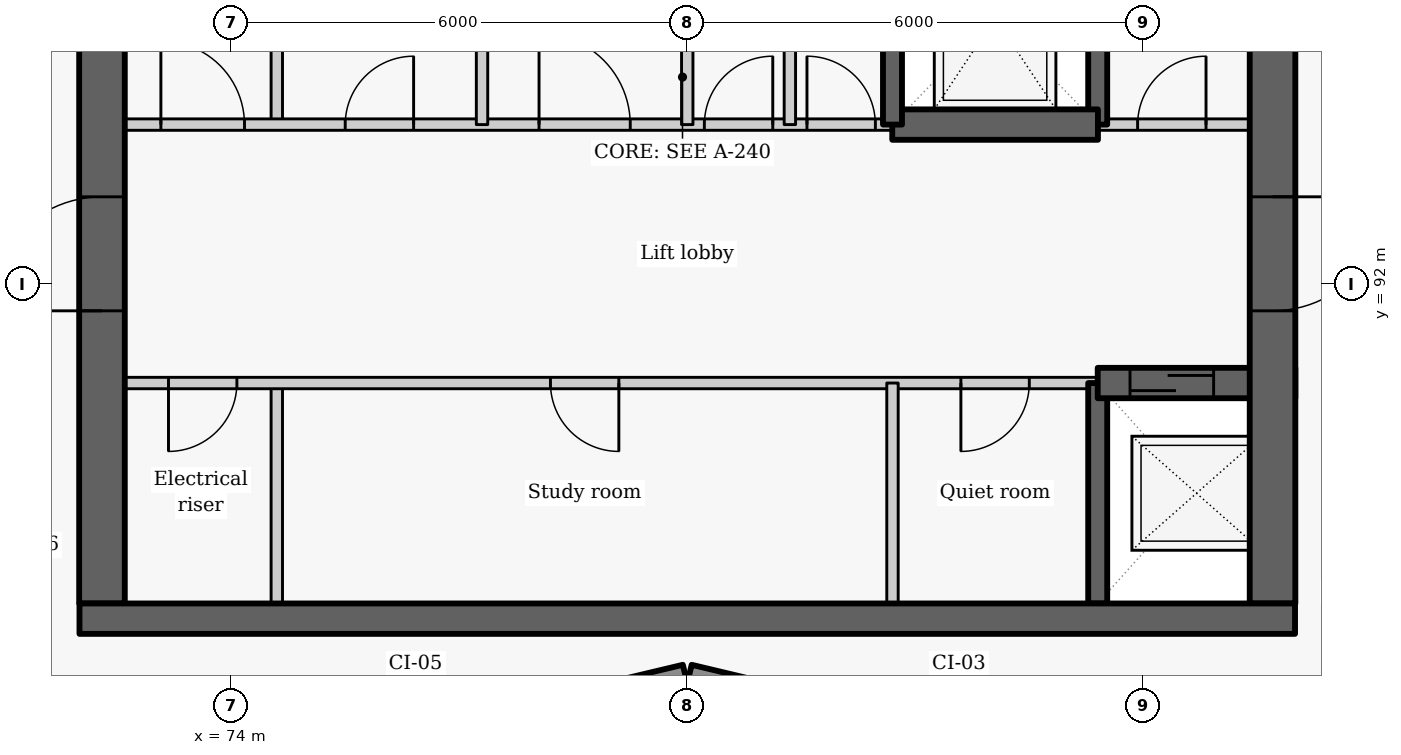
"""IFC4 building model, lengths in metres.
Left out: names, types, materials, properties, quantities, classifications, styles, units other than length and angle.
Written with IfcOpenShell. Run it as: python <this file> out.ifc"""

import sys

from ifc_helpers import new_model, si_unit, direction, frame, frame_2d, origin, place, context, subcontext, project, spatial, rectangle, extrude, element, fill, save


model = new_model("IFC4")
c1 = context("Model", 3, precision=1e-05, world=origin(), true_north=direction((0.0, 1.0)))
c2 = subcontext(c1, "Body", "Model", "MODEL_VIEW")
j1 = project(units=[si_unit("LENGTHUNIT", "METRE"), si_unit("PLANEANGLEUNIT", "RADIAN")], contexts=[c1])
p1 = place(None, origin())
s1 = spatial("IfcSite", under=j1, at=p1, CompositionType="ELEMENT")
p2 = place(p1, origin())
s2 = spatial("IfcBuilding", under=s1, at=p2, CompositionType="ELEMENT")
p3 = place(p2, frame((0.0, 0.0, 229.5)))
s3 = spatial("IfcBuildingStorey", under=s2, at=p3, CompositionType="ELEMENT", Elevation=229.5)
for number, where, z_axis, x_axis in (
    (1, (76.814, 86.119, 0.0), (0.0, 0.0, 1.0), (0.973, 0.232, 0.0)),
    (2, (80.029, 86.872, 0.0), (0.0, 0.0, 1.0), (0.973, -0.232, 0.0)),
):
    element("IfcWall", number, at=place(p3, frame(where, z_axis=z_axis, x_axis=x_axis)), inside=s3, PredefinedType="SOLIDWALL", context=c2, shape_type="SweptSolid", body=[
        extrude(rectangle(XDim=3.246, YDim=0.25, at=frame_2d((1.623, 0.0))), origin(), (0.0, 0.0, 1.0), 2.425),
    ])
p4 = place(p3, frame((74.6, 87.8, 0.0), z_axis=(0.0, 0.0, 1.0), x_axis=(0.0, 1.0, 0.0)))
e3 = element("IfcWall", 3, at=p4, inside=s3, PredefinedType="PARTITIONING", context=c2, shape_type="SweptSolid", body=[
    extrude(rectangle(XDim=2.9, YDim=0.15, at=frame_2d((1.45, 0.0))), origin(), (0.0, 0.0, 1.0), 3.025),
])
p5 = place(p3, frame((74.6, 94.1, 0.0), z_axis=(0.0, 0.0, 1.0), x_axis=(0.0, 1.0, 0.0)))
e4 = element("IfcWall", 4, at=p5, inside=s3, PredefinedType="PARTITIONING", context=c2, shape_type="SweptSolid", body=[
    extrude(rectangle(XDim=2.8, YDim=0.15, at=frame_2d((1.4, 0.0))), origin(), (0.0, 0.0, 1.0), 3.025),
])
p6 = place(p3, frame((85.4, 90.7, 0.0), z_axis=(0.0, 0.0, 1.0), x_axis=(-1.0, 0.0, 0.0)))
e5 = element("IfcWall", 5, at=p6, inside=s3, PredefinedType="PARTITIONING", context=c2, shape_type="SweptSolid", body=[
    extrude(rectangle(XDim=13.4, YDim=0.15, at=frame_2d((6.7, 0.0))), origin(), (0.0, 0.0, 1.0), 3.025),
])
p7 = place(p6, frame((11.325, 0.0, 0.0)))
e6 = element("IfcOpeningElement", 6, at=p7, cuts=e5, PredefinedType="OPENING", context=c2, shape_type="SweptSolid", body=[
    extrude(rectangle(XDim=0.9, YDim=2.1, at=frame_2d((0.45, 1.05))), frame((0.0, 0.085, 0.0), z_axis=(0.0, -1.0, 0.0), x_axis=(1.0, 0.0, 0.0)), (0.0, 0.0, 1.0), 0.17),
])
p8 = place(p6, frame((6.3, 0.0, 0.0)))
e7 = element("IfcOpeningElement", 7, at=p8, cuts=e5, PredefinedType="OPENING", context=c2, shape_type="SweptSolid", body=[
    extrude(rectangle(XDim=0.9, YDim=2.1, at=frame_2d((0.45, 1.05))), frame((0.0, 0.085, 0.0), z_axis=(0.0, -1.0, 0.0), x_axis=(1.0, 0.0, 0.0)), (0.0, 0.0, 1.0), 0.17),
])
p9 = place(p6, frame((0.9, 0.0, 0.0)))
e8 = element("IfcOpeningElement", 8, at=p9, cuts=e5, PredefinedType="OPENING", context=c2, shape_type="SweptSolid", body=[
    extrude(rectangle(XDim=0.9, YDim=2.1, at=frame_2d((0.45, 1.05))), frame((0.0, 0.085, 0.0), z_axis=(0.0, -1.0, 0.0), x_axis=(1.0, 0.0, 0.0)), (0.0, 0.0, 1.0), 0.17),
])
p10 = place(p3, frame((72.3, 87.8, -0.275), z_axis=(0.0, 0.0, 1.0), x_axis=(0.0, 1.0, 0.0)))
e9 = element("IfcWall", 9, at=p10, inside=s3, PredefinedType="SHEAR", context=c2, shape_type="SweptSolid", body=[
    extrude(rectangle(XDim=9.1, YDim=0.6, at=frame_2d((4.55, 0.0))), origin(), (0.0, 0.0, 1.0), 3.3),
])
p11 = place(p10, frame((3.85, 0.0, 0.275)))
e10 = element("IfcOpeningElement", 10, at=p11, cuts=e9, PredefinedType="OPENING", context=c2, shape_type="SweptSolid", body=[
    extrude(rectangle(XDim=1.5, YDim=2.1, at=frame_2d((0.75, 1.05))), frame((0.0, 0.31, 0.0), z_axis=(0.0, -1.0, 0.0), x_axis=(1.0, 0.0, 0.0)), (0.0, 0.0, 1.0), 0.62),
])
p12 = place(p3, frame((85.4, 87.8, -0.275), z_axis=(0.0, 0.0, 1.0), x_axis=(0.0, 1.0, 0.0)))
e11 = element("IfcWall", 11, at=p12, inside=s3, PredefinedType="SHEAR", context=c2, shape_type="SweptSolid", body=[
    extrude(rectangle(XDim=2.9, YDim=0.25, at=frame_2d((1.45, 0.0))), origin(), (0.0, 0.0, 1.0), 3.3),
])
p13 = place(p3, frame((85.4, 94.1, -0.275), z_axis=(0.0, 0.0, 1.0), x_axis=(0.0, 1.0, 0.0)))
e12 = element("IfcWall", 12, at=p13, inside=s3, PredefinedType="SHEAR", context=c2, shape_type="SweptSolid", body=[
    extrude(rectangle(XDim=2.8, YDim=0.25, at=frame_2d((1.4, 0.0))), origin(), (0.0, 0.0, 1.0), 3.3),
])
p14 = place(p3, frame((85.4, 90.7, -0.275), z_axis=(0.0, 0.0, 1.0), x_axis=(1.0, 0.0, 0.0)))
e13 = element("IfcWall", 13, at=p14, inside=s3, PredefinedType="SHEAR", context=c2, shape_type="SweptSolid", body=[
    extrude(rectangle(XDim=2.6, YDim=0.4, at=frame_2d((1.3, 0.0))), origin(), (0.0, 0.0, 1.0), 3.3),
])
p15 = place(p14, frame((0.425, 0.0, 0.275)))
e14 = element("IfcOpeningElement", 14, at=p15, cuts=e13, PredefinedType="OPENING", context=c2, shape_type="SweptSolid", body=[
    extrude(rectangle(XDim=1.1, YDim=2.1, at=frame_2d((0.55, 1.05))), frame((0.0, 0.21, 0.0), z_axis=(0.0, -1.0, 0.0), x_axis=(1.0, 0.0, 0.0)), (0.0, 0.0, 1.0), 0.42),
])
p16 = place(p3, frame((87.7, 102.05, -0.275), z_axis=(0.0, 0.0, 1.0), x_axis=(0.0, -1.0, 0.0)))
e15 = element("IfcWall", 15, at=p16, inside=s3, PredefinedType="SHEAR", context=c2, shape_type="SweptSolid", body=[
    extrude(rectangle(XDim=14.25, YDim=0.6, at=frame_2d((7.125, 0.0))), origin(), (0.0, 0.0, 1.0), 3.3),
])
p17 = place(p16, frame((8.9, 0.0, 0.275)))
e16 = element("IfcOpeningElement", 16, at=p17, cuts=e15, PredefinedType="OPENING", context=c2, shape_type="SweptSolid", body=[
    extrude(rectangle(XDim=1.5, YDim=2.1, at=frame_2d((0.75, 1.05))), frame((0.0, 0.31, 0.0), z_axis=(0.0, -1.0, 0.0), x_axis=(1.0, 0.0, 0.0)), (0.0, 0.0, 1.0), 0.62),
])
p18 = place(p16, frame((2.025, 0.0, 0.275)))
e17 = element("IfcOpeningElement", 17, at=p18, cuts=e15, PredefinedType="OPENING", context=c2, shape_type="SweptSolid", body=[
    extrude(rectangle(XDim=1.1, YDim=2.1, at=frame_2d((0.55, 1.05))), frame((0.0, 0.31, 0.0), z_axis=(0.0, -1.0, 0.0), x_axis=(1.0, 0.0, 0.0)), (0.0, 0.0, 1.0), 0.62),
])
p19 = place(p3, frame((82.7, 87.8, 0.0), z_axis=(0.0, 0.0, 1.0), x_axis=(0.0, 1.0, 0.0)))
e18 = element("IfcWall", 18, at=p19, inside=s3, PredefinedType="PARTITIONING", context=c2, shape_type="SweptSolid", body=[
    extrude(rectangle(XDim=2.9, YDim=0.15, at=frame_2d((1.45, 0.0))), origin(), (0.0, 0.0, 1.0), 3.025),
])
p20 = place(p3, frame((72.0, 94.1, 0.0), z_axis=(0.0, 0.0, 1.0), x_axis=(1.0, 0.0, 0.0)))
e19 = element("IfcWall", 19, at=p20, inside=s3, PredefinedType="PARTITIONING", context=c2, shape_type="SweptSolid", body=[
    extrude(rectangle(XDim=10.703, YDim=0.15, at=frame_2d((5.352, 0.0))), origin(), (0.0, 0.0, 1.0), 3.025),
])
p21 = place(p20, frame((1.075, 0.0, 0.0)))
e20 = element("IfcOpeningElement", 20, at=p21, cuts=e19, PredefinedType="OPENING", context=c2, shape_type="SweptSolid", body=[
    extrude(rectangle(XDim=1.1, YDim=2.1, at=frame_2d((0.55, 1.05))), frame((0.0, 0.085, 0.0), z_axis=(0.0, -1.0, 0.0), x_axis=(1.0, 0.0, 0.0)), (0.0, 0.0, 1.0), 0.17),
])
p22 = place(p20, frame((3.5, 0.0, 0.0)))
e21 = element("IfcOpeningElement", 21, at=p22, cuts=e19, PredefinedType="OPENING", context=c2, shape_type="SweptSolid", body=[
    extrude(rectangle(XDim=0.9, YDim=2.1, at=frame_2d((0.45, 1.05))), frame((0.0, 0.085, 0.0), z_axis=(0.0, -1.0, 0.0), x_axis=(1.0, 0.0, 0.0)), (0.0, 0.0, 1.0), 0.17),
])
p23 = place(p20, frame((6.05, 0.0, 0.0)))
e22 = element("IfcOpeningElement", 22, at=p23, cuts=e19, PredefinedType="OPENING", context=c2, shape_type="SweptSolid", body=[
    extrude(rectangle(XDim=1.2, YDim=2.1, at=frame_2d((0.6, 1.05))), frame((0.0, 0.085, 0.0), z_axis=(0.0, -1.0, 0.0), x_axis=(1.0, 0.0, 0.0)), (0.0, 0.0, 1.0), 0.17),
])
p24 = place(p20, frame((8.225, 0.0, 0.0)))
e23 = element("IfcOpeningElement", 23, at=p24, cuts=e19, PredefinedType="OPENING", context=c2, shape_type="SweptSolid", body=[
    extrude(rectangle(XDim=0.9, YDim=2.1, at=frame_2d((0.45, 1.05))), frame((0.0, 0.085, 0.0), z_axis=(0.0, -1.0, 0.0), x_axis=(1.0, 0.0, 0.0)), (0.0, 0.0, 1.0), 0.17),
])
p25 = place(p20, frame((9.575, 0.0, 0.0)))
e24 = element("IfcOpeningElement", 24, at=p25, cuts=e19, PredefinedType="OPENING", context=c2, shape_type="SweptSolid", body=[
    extrude(rectangle(XDim=0.9, YDim=2.1, at=frame_2d((0.45, 1.05))), frame((0.0, 0.085, 0.0), z_axis=(0.0, -1.0, 0.0), x_axis=(1.0, 0.0, 0.0)), (0.0, 0.0, 1.0), 0.17),
])
p26 = place(p3, frame((85.397, 94.1, 0.0), z_axis=(0.0, 0.0, 1.0), x_axis=(1.0, 0.0, 0.0)))
e25 = element("IfcWall", 25, at=p26, inside=s3, PredefinedType="PARTITIONING", context=c2, shape_type="SweptSolid", body=[
    extrude(rectangle(XDim=2.603, YDim=0.15, at=frame_2d((1.302, 0.0))), origin(), (0.0, 0.0, 1.0), 3.025),
])
p27 = place(p26, frame((0.528, 0.0, 0.0)))
e26 = element("IfcOpeningElement", 26, at=p27, cuts=e25, PredefinedType="OPENING", context=c2, shape_type="SweptSolid", body=[
    extrude(rectangle(XDim=0.9, YDim=2.1, at=frame_2d((0.45, 1.05))), frame((0.0, 0.085, 0.0), z_axis=(0.0, -1.0, 0.0), x_axis=(1.0, 0.0, 0.0)), (0.0, 0.0, 1.0), 0.17),
])
p28 = place(p3, frame((82.697, 94.1, -0.275), z_axis=(0.0, 0.0, 1.0), x_axis=(1.0, 0.0, 0.0)))
e27 = element("IfcWall", 27, at=p28, inside=s3, PredefinedType="SHEAR", context=c2, shape_type="SweptSolid", body=[
    extrude(rectangle(XDim=2.706, YDim=0.4, at=frame_2d((1.353, 0.0))), origin(), (0.0, 0.0, 1.0), 3.3),
])
for number, where, z_axis, x_axis in (
    (28, (77.3, 94.1, 0.0), (0.0, 0.0, 1.0), (0.0, 1.0, 0.0)),
    (29, (80.0, 94.1, 0.0), (0.0, 0.0, 1.0), (0.0, 1.0, 0.0)),
    (30, (81.35, 94.1, 0.0), (0.0, 0.0, 1.0), (0.0, 1.0, 0.0)),
):
    element("IfcWall", number, at=place(p3, frame(where, z_axis=z_axis, x_axis=x_axis)), inside=s3, PredefinedType="PARTITIONING", context=c2, shape_type="SweptSolid", body=[
        extrude(rectangle(XDim=2.8, YDim=0.15, at=frame_2d((1.4, 0.0))), origin(), (0.0, 0.0, 1.0), 3.025),
    ])
p29 = place(p3, frame((82.7, 94.1, -0.275), z_axis=(0.0, 0.0, 1.0), x_axis=(0.0, 1.0, 0.0)))
e31 = element("IfcWall", 31, at=p29, inside=s3, PredefinedType="SHEAR", context=c2, shape_type="SweptSolid", body=[
    extrude(rectangle(XDim=2.8, YDim=0.25, at=frame_2d((1.4, 0.0))), origin(), (0.0, 0.0, 1.0), 3.3),
])
p30 = place(p3, frame((72.004, 87.6, -0.275), z_axis=(0.0, 0.0, 1.0), x_axis=(1.0, 0.0, 0.0)))
e32 = element("IfcWall", 32, at=p30, inside=s3, PredefinedType="SHEAR", context=c2, shape_type="SweptSolid", body=[
    extrude(rectangle(XDim=15.992, YDim=0.4, at=frame_2d((7.996, 0.0))), origin(), (0.0, 0.0, 1.0), 3.3),
])
p31 = place(p7, origin())
e33 = element("IfcDoor", 33, at=p31, inside=s3, OperationType="SINGLE_SWING_RIGHT", PredefinedType="DOOR", context=c2, shape_type="SweptSolid", body=[
    extrude(rectangle(XDim=0.9, YDim=2.1, at=frame_2d((0.45, 1.05))), frame((0.0, 0.025, 0.0), z_axis=(0.0, -1.0, 0.0), x_axis=(1.0, 0.0, 0.0)), (0.0, 0.0, 1.0), 0.05),
])
fill(e6, e33)
p32 = place(p15, origin())
e34 = element("IfcDoor", 34, at=p32, inside=s3, OperationType="SLIDING_TO_LEFT", PredefinedType="DOOR", context=c2, shape_type="SweptSolid", body=[
    extrude(rectangle(XDim=1.1, YDim=2.1, at=frame_2d((0.55, 1.05))), frame((0.0, 0.025, 0.0), z_axis=(0.0, -1.0, 0.0), x_axis=(1.0, 0.0, 0.0)), (0.0, 0.0, 1.0), 0.05),
])
fill(e14, e34)
p33 = place(p8, origin())
e35 = element("IfcDoor", 35, at=p33, inside=s3, OperationType="SINGLE_SWING_LEFT", PredefinedType="DOOR", context=c2, shape_type="SweptSolid", body=[
    extrude(rectangle(XDim=0.9, YDim=2.1, at=frame_2d((0.45, 1.05))), frame((0.0, 0.025, 0.0), z_axis=(0.0, -1.0, 0.0), x_axis=(1.0, 0.0, 0.0)), (0.0, 0.0, 1.0), 0.05),
])
fill(e7, e35)
p34 = place(p9, origin())
e36 = element("IfcDoor", 36, at=p34, inside=s3, OperationType="SINGLE_SWING_RIGHT", PredefinedType="DOOR", context=c2, shape_type="SweptSolid", body=[
    extrude(rectangle(XDim=0.9, YDim=2.1, at=frame_2d((0.45, 1.05))), frame((0.0, 0.025, 0.0), z_axis=(0.0, -1.0, 0.0), x_axis=(1.0, 0.0, 0.0)), (0.0, 0.0, 1.0), 0.05),
])
fill(e8, e36)
p35 = place(p21, origin())
e37 = element("IfcDoor", 37, at=p35, inside=s3, OperationType="SINGLE_SWING_LEFT", PredefinedType="DOOR", context=c2, shape_type="SweptSolid", body=[
    extrude(rectangle(XDim=1.1, YDim=2.1, at=frame_2d((0.55, 1.05))), frame((0.0, 0.025, 0.0), z_axis=(0.0, -1.0, 0.0), x_axis=(1.0, 0.0, 0.0)), (0.0, 0.0, 1.0), 0.05),
])
fill(e20, e37)
p36 = place(p22, origin())
e38 = element("IfcDoor", 38, at=p36, inside=s3, OperationType="SINGLE_SWING_RIGHT", PredefinedType="DOOR", context=c2, shape_type="SweptSolid", body=[
    extrude(rectangle(XDim=0.9, YDim=2.1, at=frame_2d((0.45, 1.05))), frame((0.0, 0.025, 0.0), z_axis=(0.0, -1.0, 0.0), x_axis=(1.0, 0.0, 0.0)), (0.0, 0.0, 1.0), 0.05),
])
fill(e21, e38)
p37 = place(p23, origin())
e39 = element("IfcDoor", 39, at=p37, inside=s3, OperationType="DOUBLE_DOOR_SINGLE_SWING", PredefinedType="DOOR", context=c2, shape_type="SweptSolid", body=[
    extrude(rectangle(XDim=1.2, YDim=2.1, at=frame_2d((0.6, 1.05))), frame((0.0, 0.025, 0.0), z_axis=(0.0, -1.0, 0.0), x_axis=(1.0, 0.0, 0.0)), (0.0, 0.0, 1.0), 0.05),
])
fill(e22, e39)
p38 = place(p24, origin())
e40 = element("IfcDoor", 40, at=p38, inside=s3, OperationType="SINGLE_SWING_RIGHT", PredefinedType="DOOR", context=c2, shape_type="SweptSolid", body=[
    extrude(rectangle(XDim=0.9, YDim=2.1, at=frame_2d((0.45, 1.05))), frame((0.0, 0.025, 0.0), z_axis=(0.0, -1.0, 0.0), x_axis=(1.0, 0.0, 0.0)), (0.0, 0.0, 1.0), 0.05),
])
fill(e23, e40)
p39 = place(p25, origin())
e41 = element("IfcDoor", 41, at=p39, inside=s3, OperationType="SINGLE_SWING_LEFT", PredefinedType="DOOR", context=c2, shape_type="SweptSolid", body=[
    extrude(rectangle(XDim=0.9, YDim=2.1, at=frame_2d((0.45, 1.05))), frame((0.0, 0.025, 0.0), z_axis=(0.0, -1.0, 0.0), x_axis=(1.0, 0.0, 0.0)), (0.0, 0.0, 1.0), 0.05),
])
fill(e24, e41)
p40 = place(p27, origin())
e42 = element("IfcDoor", 42, at=p40, inside=s3, OperationType="SINGLE_SWING_RIGHT", PredefinedType="DOOR", context=c2, shape_type="SweptSolid", body=[
    extrude(rectangle(XDim=0.9, YDim=2.1, at=frame_2d((0.45, 1.05))), frame((0.0, 0.025, 0.0), z_axis=(0.0, -1.0, 0.0), x_axis=(1.0, 0.0, 0.0)), (0.0, 0.0, 1.0), 0.05),
])
fill(e26, e42)
p41 = place(p17, origin())
e43 = element("IfcDoor", 43, at=p41, inside=s3, OperationType="DOUBLE_DOOR_SINGLE_SWING", PredefinedType="DOOR", context=c2, shape_type="SweptSolid", body=[
    extrude(rectangle(XDim=1.5, YDim=2.1, at=frame_2d((0.75, 1.05))), frame((0.0, 0.025, 0.0), z_axis=(0.0, -1.0, 0.0), x_axis=(1.0, 0.0, 0.0)), (0.0, 0.0, 1.0), 0.05),
])
fill(e16, e43)
p42 = place(p11, origin())
e44 = element("IfcDoor", 44, at=p42, inside=s3, OperationType="DOUBLE_DOOR_SINGLE_SWING", PredefinedType="DOOR", context=c2, shape_type="SweptSolid", body=[
    extrude(rectangle(XDim=1.5, YDim=2.1, at=frame_2d((0.75, 1.05))), frame((0.0, 0.025, 0.0), z_axis=(0.0, -1.0, 0.0), x_axis=(1.0, 0.0, 0.0)), (0.0, 0.0, 1.0), 0.05),
])
fill(e10, e44)
save(model, sys.argv[1])
